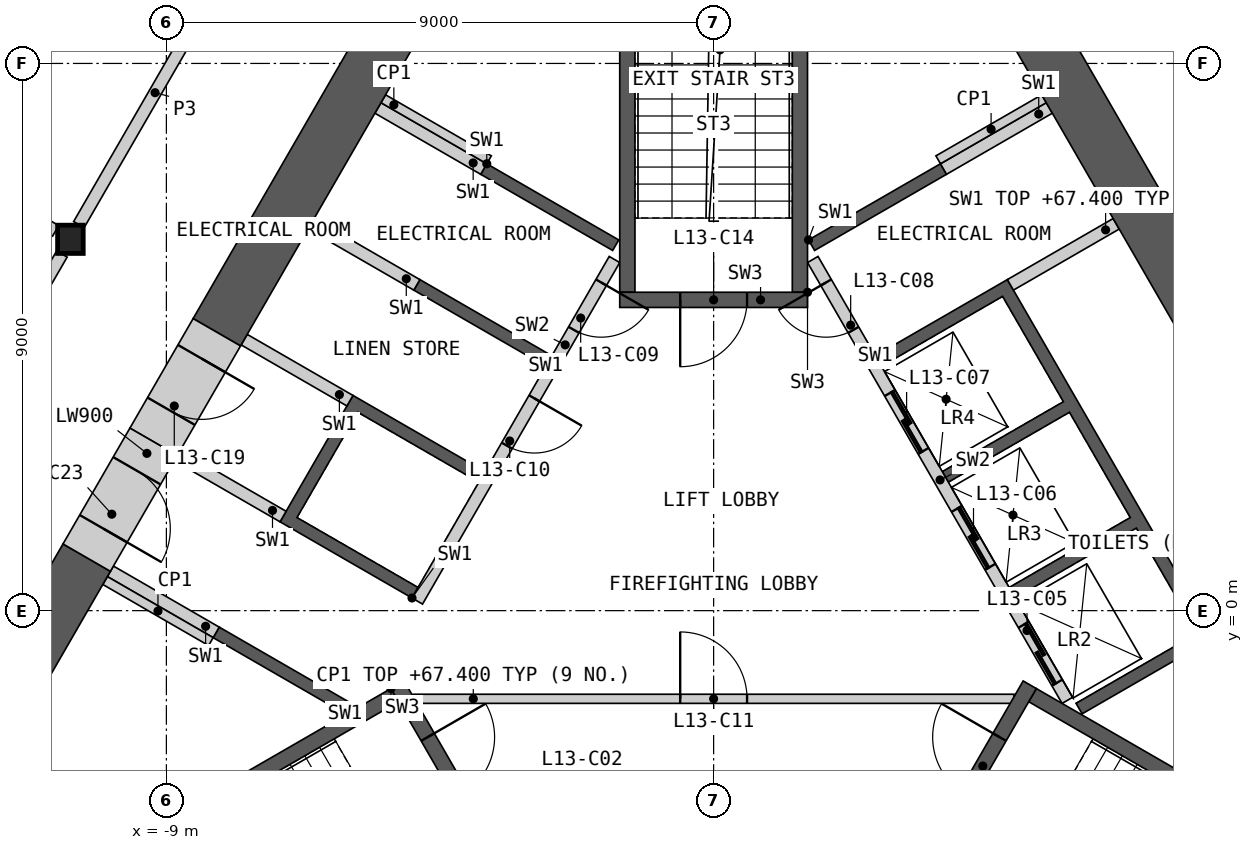
"""IFC4 building model, lengths in metres.
Left out: names, types, materials, properties, quantities, classifications, styles, units other than length and angle.
Written with IfcOpenShell. Run it as: python <this file> out.ifc"""

import sys

from ifc_helpers import new_model, si_unit, direction, frame, frame_2d, origin, origin_2d, place, context, subcontext, project, spatial, polyline, rectangle, i_section, outline, extrude, element, fill, save


model = new_model("IFC4")
c1 = context("Model", 3, precision=1e-05, world=origin(), true_north=direction((0.0, 1.0)))
c2 = subcontext(c1, "Body", "Model", "MODEL_VIEW")
j1 = project(units=[si_unit("LENGTHUNIT", "METRE"), si_unit("PLANEANGLEUNIT", "RADIAN")], contexts=[c1])
p1 = place(None, origin())
s1 = spatial("IfcSite", under=j1, at=p1, CompositionType="ELEMENT")
p2 = place(p1, origin())
s2 = spatial("IfcBuilding", under=s1, at=p2, CompositionType="ELEMENT")
p3 = place(p2, frame((0.0, 0.0, 63.6)))
s3 = spatial("IfcBuildingStorey", under=s2, at=p3, CompositionType="ELEMENT", Elevation=63.6)
p4 = place(p3, frame((-10.578, 6.107, 0.0), z_axis=(0.0, 0.0, 1.0), x_axis=(1.0, 0.0, 0.0)))
e1 = element("IfcColumn", 1, at=p4, inside=s3, PredefinedType="COLUMN", context=c2, shape_type="SweptSolid", body=[
    extrude(i_section(OverallWidth=0.421, OverallDepth=0.465, WebThickness=0.045, FlangeThickness=0.072, at=origin_2d()), origin(), (0.0, 0.0, 1.0), 4.2),
])
p5 = place(p3, origin())
e2 = element("IfcWall", 2, at=p5, inside=s3, PredefinedType="SHEAR", context=c2, shape_type="SweptSolid", body=[
    extrude(outline(polyline([(1.561, 6.097), (3.731, 7.35), (3.831, 7.177), (1.66, 5.924), (1.561, 6.097)])), origin(), (0.0, 0.0, 1.0), 3.8),
])
p6 = place(p3, origin())
e3 = element("IfcWall", 3, at=p6, inside=s3, PredefinedType="SHEAR", context=c2, shape_type="SweptSolid", body=[
    extrude(outline(polyline([(2.66, 4.192), (4.831, 5.445), (8.231, -0.444), (6.061, -1.697), (5.96, -1.524), (7.952, -0.374), (6.952, 1.358), (4.96, 0.208), (4.861, 0.381), (6.852, 1.531), (5.852, 3.263), (3.861, 2.113), (3.76, 2.287), (5.752, 3.437), (4.752, 5.169), (2.76, 4.019), (2.66, 4.192)])), origin(), (0.0, 0.0, 1.0), 3.8),
])
p7 = place(p3, frame((5.817, -1.476, 0.0), z_axis=(0.0, 0.0, 1.0), x_axis=(-0.500002616675, 0.866023893041, 0.0)))
e4 = element("IfcWall", 4, at=p7, inside=s3, PredefinedType="SOLIDWALL", context=c2, shape_type="SweptSolid", body=[
    extrude(rectangle(XDim=8.373, YDim=0.2, at=frame_2d((4.187, 0.0))), origin(), (0.0, 0.0, 1.0), 3.8),
])
p8 = place(p7, frame((0.337, 0.0, 0.0)))
e5 = element("IfcOpeningElement", 5, at=p8, cuts=e4, PredefinedType="OPENING", context=c2, shape_type="SweptSolid", body=[
    extrude(rectangle(XDim=1.1, YDim=2.1, at=frame_2d((0.55, 1.05))), frame((0.0, 0.11, 0.0), z_axis=(0.0, -1.0, 0.0), x_axis=(1.0, 0.0, 0.0)), (0.0, 0.0, 1.0), 0.22),
])
p9 = place(p7, frame((2.537, 0.0, 0.0)))
e6 = element("IfcOpeningElement", 6, at=p9, cuts=e4, PredefinedType="OPENING", context=c2, shape_type="SweptSolid", body=[
    extrude(rectangle(XDim=1.1, YDim=2.1, at=frame_2d((0.55, 1.05))), frame((0.0, 0.11, 0.0), z_axis=(0.0, -1.0, 0.0), x_axis=(1.0, 0.0, 0.0)), (0.0, 0.0, 1.0), 0.22),
])
p10 = place(p7, frame((4.737, 0.0, 0.0)))
e7 = element("IfcOpeningElement", 7, at=p10, cuts=e4, PredefinedType="OPENING", context=c2, shape_type="SweptSolid", body=[
    extrude(rectangle(XDim=1.1, YDim=2.1, at=frame_2d((0.55, 1.05))), frame((0.0, 0.11, 0.0), z_axis=(0.0, -1.0, 0.0), x_axis=(1.0, 0.0, 0.0)), (0.0, 0.0, 1.0), 0.22),
])
p11 = place(p7, frame((7.037, 0.0, 0.0)))
e8 = element("IfcOpeningElement", 8, at=p11, cuts=e4, PredefinedType="OPENING", context=c2, shape_type="SweptSolid", body=[
    extrude(rectangle(XDim=0.9, YDim=2.1, at=frame_2d((0.45, 1.05))), frame((0.0, 0.11, 0.0), z_axis=(0.0, -1.0, 0.0), x_axis=(1.0, 0.0, 0.0)), (0.0, 0.0, 1.0), 0.22),
])
p12 = place(p3, frame((4.881, 5.358, 0.0), z_axis=(0.0, 0.0, 1.0), x_axis=(0.866035824272, 0.499981950752, 0.0)))
e9 = element("IfcWall", 9, at=p12, inside=s3, PredefinedType="SHEAR", context=c2, shape_type="SweptSolid", body=[
    extrude(rectangle(XDim=2.009, YDim=0.2, at=frame_2d((1.004, 0.0))), origin(), (0.0, 0.0, 1.0), 3.8),
])
p13 = place(p3, frame((3.781, 7.263, 0.0), z_axis=(0.0, 0.0, 1.0), x_axis=(0.865983199114, 0.50007309351, 0.0)))
e10 = element("IfcWall", 10, at=p13, inside=s3, PredefinedType="SHEAR", context=c2, shape_type="SweptSolid", body=[
    extrude(rectangle(XDim=2.009, YDim=0.2, at=frame_2d((1.004, 0.0))), origin(), (0.0, 0.0, 1.0), 3.8),
])
p14 = place(p3, origin())
e11 = element("IfcWall", 11, at=p14, inside=s3, PredefinedType="SHEAR", context=c2, shape_type="SweptSolid", body=[
    extrude(outline(polyline([(-6.061, -1.697), (-8.231, -0.444), (-8.131, -0.271), (-5.96, -1.524), (-6.061, -1.697)])), origin(), (0.0, 0.0, 1.0), 3.8),
])
p15 = place(p3, origin())
e12 = element("IfcWall", 12, at=p15, inside=s3, PredefinedType="SHEAR", context=c2, shape_type="SweptSolid", body=[
    extrude(outline(polyline([(-4.96, 0.208), (-7.131, 1.461), (-5.931, 3.54), (-3.76, 2.287), (-3.861, 2.113), (-5.852, 3.263), (-6.852, 1.531), (-4.861, 0.381), (-4.96, 0.208)])), origin(), (0.0, 0.0, 1.0), 3.8),
])
p16 = place(p3, origin())
e13 = element("IfcWall", 13, at=p16, inside=s3, PredefinedType="SHEAR", context=c2, shape_type="SweptSolid", body=[
    extrude(outline(polyline([(-2.76, 4.019), (-4.931, 5.272), (-4.831, 5.445), (-2.66, 4.192), (-2.76, 4.019)])), origin(), (0.0, 0.0, 1.0), 3.8),
])
p17 = place(p3, origin())
e14 = element("IfcWall", 14, at=p17, inside=s3, PredefinedType="SHEAR", context=c2, shape_type="SweptSolid", body=[
    extrude(outline(polyline([(-3.731, 7.35), (-1.561, 6.097), (-1.66, 5.924), (-3.831, 7.177), (-3.731, 7.35)])), origin(), (0.0, 0.0, 1.0), 3.8),
])
p18 = place(p3, frame((-1.631, 5.776, 0.0), z_axis=(0.0, 0.0, 1.0), x_axis=(-0.499992876559, -0.866029516466, 0.0)))
e15 = element("IfcWall", 15, at=p18, inside=s3, PredefinedType="SOLIDWALL", context=c2, shape_type="SweptSolid", body=[
    extrude(rectangle(XDim=6.486, YDim=0.2, at=frame_2d((3.243, 0.0))), origin(), (0.0, 0.0, 1.0), 3.8),
])
p19 = place(p18, frame((0.437, 0.0, 0.0)))
e16 = element("IfcOpeningElement", 16, at=p19, cuts=e15, PredefinedType="OPENING", context=c2, shape_type="SweptSolid", body=[
    extrude(rectangle(XDim=0.9, YDim=2.1, at=frame_2d((0.45, 1.05))), frame((0.0, 0.11, 0.0), z_axis=(0.0, -1.0, 0.0), x_axis=(1.0, 0.0, 0.0)), (0.0, 0.0, 1.0), 0.22),
])
p20 = place(p18, frame((2.637, 0.0, 0.0)))
e17 = element("IfcOpeningElement", 17, at=p20, cuts=e15, PredefinedType="OPENING", context=c2, shape_type="SweptSolid", body=[
    extrude(rectangle(XDim=0.9, YDim=2.1, at=frame_2d((0.45, 1.05))), frame((0.0, 0.11, 0.0), z_axis=(0.0, -1.0, 0.0), x_axis=(1.0, 0.0, 0.0)), (0.0, 0.0, 1.0), 0.22),
])
p21 = place(p3, frame((-3.781, 7.263, 0.0), z_axis=(0.0, 0.0, 1.0), x_axis=(-0.865983199114, 0.50007309351, 0.0)))
e18 = element("IfcWall", 18, at=p21, inside=s3, PredefinedType="SHEAR", context=c2, shape_type="SweptSolid", body=[
    extrude(rectangle(XDim=2.009, YDim=0.2, at=frame_2d((1.004, 0.0))), origin(), (0.0, 0.0, 1.0), 3.8),
])
p22 = place(p3, frame((-4.881, 5.358, 0.0), z_axis=(0.0, 0.0, 1.0), x_axis=(-0.866035824272, 0.499981950752, 0.0)))
e19 = element("IfcWall", 19, at=p22, inside=s3, PredefinedType="SHEAR", context=c2, shape_type="SweptSolid", body=[
    extrude(rectangle(XDim=2.009, YDim=0.2, at=frame_2d((1.004, 0.0))), origin(), (0.0, 0.0, 1.0), 3.8),
])
p23 = place(p3, frame((-5.981, 3.453, 0.0), z_axis=(0.0, 0.0, 1.0), x_axis=(-0.866013584312, 0.500020471368, 0.0)))
e20 = element("IfcWall", 20, at=p23, inside=s3, PredefinedType="SHEAR", context=c2, shape_type="SweptSolid", body=[
    extrude(rectangle(XDim=2.009, YDim=0.2, at=frame_2d((1.005, 0.0))), origin(), (0.0, 0.0, 1.0), 3.8),
])
p24 = place(p3, frame((-7.081, 1.548, 0.0), z_axis=(0.0, 0.0, 1.0), x_axis=(-0.865983199114, 0.50007309351, 0.0)))
e21 = element("IfcWall", 21, at=p24, inside=s3, PredefinedType="SHEAR", context=c2, shape_type="SweptSolid", body=[
    extrude(rectangle(XDim=2.009, YDim=0.2, at=frame_2d((1.004, 0.0))), origin(), (0.0, 0.0, 1.0), 3.8),
])
p25 = place(p3, frame((-8.181, -0.357, 0.0), z_axis=(0.0, 0.0, 1.0), x_axis=(-0.866035824272, 0.499981950752, 0.0)))
e22 = element("IfcWall", 22, at=p25, inside=s3, PredefinedType="SHEAR", context=c2, shape_type="SweptSolid", body=[
    extrude(rectangle(XDim=2.009, YDim=0.2, at=frame_2d((1.004, 0.0))), origin(), (0.0, 0.0, 1.0), 3.8),
])
p26 = place(p3, frame((-4.941, -1.45, 0.0), z_axis=(0.0, 0.0, 1.0), x_axis=(1.0, 0.0, 0.0)))
e23 = element("IfcWall", 23, at=p26, inside=s3, PredefinedType="PARTITIONING", context=c2, shape_type="SweptSolid", body=[
    extrude(rectangle(XDim=9.882, YDim=0.15, at=frame_2d((4.941, 0.0))), origin(), (0.0, 0.0, 1.0), 3.8),
])
p27 = place(p26, frame((4.391, 0.0, 0.0)))
e24 = element("IfcOpeningElement", 24, at=p27, cuts=e23, PredefinedType="OPENING", context=c2, shape_type="SweptSolid", body=[
    extrude(rectangle(XDim=1.1, YDim=2.1, at=frame_2d((0.55, 1.05))), frame((0.0, 0.085, 0.0), z_axis=(0.0, -1.0, 0.0), x_axis=(1.0, 0.0, 0.0)), (0.0, 0.0, 1.0), 0.17),
])
p28 = place(p3, origin())
e25 = element("IfcWall", 25, at=p28, inside=s3, PredefinedType="SHEAR", context=c2, shape_type="SweptSolid", body=[
    extrude(outline(polyline([(-5.307, -1.281), (-10.374, -4.206), (-10.032, -4.298), (-5.182, -1.498), (-5.307, -1.281)])), origin(), (0.0, 0.0, 1.0), 3.8),
])
p29 = place(p3, frame((-5.199, -1.219, 0.0), z_axis=(0.0, 0.0, 1.0), x_axis=(0.499982516597, -0.866035497597, 0.0)))
e26 = element("IfcWall", 26, at=p29, inside=s3, PredefinedType="SHEAR", context=c2, shape_type="SweptSolid", body=[
    extrude(rectangle(XDim=3.088, YDim=0.25, at=frame_2d((1.544, 0.0))), origin(), (0.0, 0.0, 1.0), 3.8),
])
p30 = place(p29, frame((0.994, 0.0, 0.0)))
e27 = element("IfcOpeningElement", 27, at=p30, cuts=e26, PredefinedType="OPENING", context=c2, shape_type="SweptSolid", body=[
    extrude(rectangle(XDim=1.1, YDim=2.1, at=frame_2d((0.55, 1.05))), frame((0.0, 0.135, 0.0), z_axis=(0.0, -1.0, 0.0), x_axis=(1.0, 0.0, 0.0)), (0.0, 0.0, 1.0), 0.27),
])
p31 = place(p3, origin())
e28 = element("IfcWall", 28, at=p31, inside=s3, PredefinedType="SHEAR", context=c2, shape_type="SweptSolid", body=[
    extrude(outline(polyline([(10.032, -4.298), (10.374, -4.206), (5.307, -1.281), (5.182, -1.498), (10.032, -4.298)])), origin(), (0.0, 0.0, 1.0), 3.8),
])
p32 = place(p3, frame((3.655, -3.893, 0.0), z_axis=(0.0, 0.0, 1.0), x_axis=(0.499982516597, 0.866035497597, 0.0)))
e29 = element("IfcWall", 29, at=p32, inside=s3, PredefinedType="SHEAR", context=c2, shape_type="SweptSolid", body=[
    extrude(rectangle(XDim=3.088, YDim=0.25, at=frame_2d((1.544, 0.0))), origin(), (0.0, 0.0, 1.0), 3.8),
])
p33 = place(p32, frame((0.994, 0.0, 0.0)))
e30 = element("IfcOpeningElement", 30, at=p33, cuts=e29, PredefinedType="OPENING", context=c2, shape_type="SweptSolid", body=[
    extrude(rectangle(XDim=1.1, YDim=2.1, at=frame_2d((0.55, 1.05))), frame((0.0, 0.135, 0.0), z_axis=(0.0, -1.0, 0.0), x_axis=(1.0, 0.0, 0.0)), (0.0, 0.0, 1.0), 0.27),
])
p34 = place(p3, origin())
e31 = element("IfcWall", 31, at=p34, inside=s3, PredefinedType="SHEAR", context=c2, shape_type="SweptSolid", body=[
    extrude(outline(polyline([(1.544, 5.237), (1.544, 11.087), (1.294, 10.837), (1.294, 5.237), (1.544, 5.237)])), origin(), (0.0, 0.0, 1.0), 3.8),
])
p35 = place(p3, origin())
e32 = element("IfcWall", 32, at=p35, inside=s3, PredefinedType="SHEAR", context=c2, shape_type="SweptSolid", body=[
    extrude(outline(polyline([(-1.294, 10.837), (-1.544, 11.087), (-1.544, 5.237), (-1.294, 5.237), (-1.294, 10.837)])), origin(), (0.0, 0.0, 1.0), 3.8),
])
p36 = place(p3, frame((1.544, 5.112, 0.0), z_axis=(0.0, 0.0, 1.0), x_axis=(-1.0, 0.0, 0.0)))
e33 = element("IfcWall", 33, at=p36, inside=s3, PredefinedType="SHEAR", context=c2, shape_type="SweptSolid", body=[
    extrude(rectangle(XDim=3.088, YDim=0.25, at=frame_2d((1.544, 0.0))), origin(), (0.0, 0.0, 1.0), 3.8),
])
p37 = place(p36, frame((0.994, 0.0, 0.0)))
e34 = element("IfcOpeningElement", 34, at=p37, cuts=e33, PredefinedType="OPENING", context=c2, shape_type="SweptSolid", body=[
    extrude(rectangle(XDim=1.1, YDim=2.1, at=frame_2d((0.55, 1.05))), frame((0.0, 0.135, 0.0), z_axis=(0.0, -1.0, 0.0), x_axis=(1.0, 0.0, 0.0)), (0.0, 0.0, 1.0), 0.27),
])
for number, where, z_axis, x_axis in (
    (35, (3.693, 7.415, 0.0), (0.0, 0.0, 1.0), (0.866, 0.5, 0.0)),
    (36, (-8.268, -0.509, 0.0), (0.0, 0.0, 1.0), (-0.866, 0.5, 0.0)),
    (37, (-3.693, 7.415, 0.0), (0.0, 0.0, 1.0), (-0.866, 0.5, 0.0)),
):
    element("IfcWall", number, at=place(p3, frame(where, z_axis=z_axis, x_axis=x_axis)), inside=s3, PredefinedType="PARTITIONING", context=c2, shape_type="SweptSolid", body=[
        extrude(rectangle(XDim=2.009, YDim=0.15, at=frame_2d((1.004, 0.0))), origin(), (0.0, 0.0, 1.0), 3.8),
    ])
p38 = place(p3, frame((8.16, 4.596, 0.0), z_axis=(0.0, 0.0, 1.0), x_axis=(-0.500009830349, 0.866019728156, 0.0)))
e38 = element("IfcWall", 38, at=p38, inside=s3, PredefinedType="SHEAR", context=c2, shape_type="SweptSolid", body=[
    extrude(rectangle(XDim=15.541, YDim=0.9, at=frame_2d((7.771, 0.0))), origin(), (0.0, 0.0, 1.0), 3.8),
])
p39 = place(p3, frame((-3.637, 12.43, 0.0), z_axis=(0.0, 0.0, 1.0), x_axis=(-0.500011513458, -0.866018756384, 0.0)))
e39 = element("IfcWall", 39, at=p39, inside=s3, PredefinedType="SHEAR", context=c2, shape_type="SweptSolid", body=[
    extrude(rectangle(XDim=9.066, YDim=0.9, at=frame_2d((4.533, 0.0))), origin(), (0.0, 0.0, 1.0), 3.8),
])
p40 = place(p3, frame((-10.31, 0.872, 0.0), z_axis=(0.0, 0.0, 1.0), x_axis=(-0.499968858743, -0.866043382451, 0.0)))
e40 = element("IfcWall", 40, at=p40, inside=s3, PredefinedType="SHEAR", context=c2, shape_type="SweptSolid", body=[
    extrude(rectangle(XDim=4.546, YDim=0.9, at=frame_2d((2.273, 0.0))), origin(), (0.0, 0.0, 1.0), 3.8),
])
p41 = place(p3, frame((-8.17, 4.579, 0.0), z_axis=(0.0, 0.0, 1.0), x_axis=(-0.499888406853, -0.866089822532, 0.0)))
e41 = element("IfcWall", 41, at=p41, inside=s3, PredefinedType="SHEAR", context=c2, shape_type="SweptSolid", body=[
    extrude(rectangle(XDim=2.08, YDim=0.9, at=frame_2d((1.04, 0.0))), origin(), (0.0, 0.0, 1.0), 3.8),
])
p42 = place(p41, frame((0.5, 0.0, 0.0)))
e42 = element("IfcOpeningElement", 42, at=p42, cuts=e41, PredefinedType="OPENING", context=c2, shape_type="SweptSolid", body=[
    extrude(rectangle(XDim=1.0, YDim=2.1, at=frame_2d((0.5, 1.05))), frame((0.0, 0.46, 0.0), z_axis=(0.0, -1.0, 0.0), x_axis=(1.0, 0.0, 0.0)), (0.0, 0.0, 1.0), 0.92),
])
p43 = place(p3, frame((-9.21, 2.777, 0.0), z_axis=(0.0, 0.0, 1.0), x_axis=(-0.500077893725, -0.86598042715, 0.0)))
e43 = element("IfcWall", 43, at=p43, inside=s3, PredefinedType="SHEAR", context=c2, shape_type="SweptSolid", body=[
    extrude(rectangle(XDim=2.2, YDim=0.9, at=frame_2d((1.1, 0.0))), origin(), (0.0, 0.0, 1.0), 3.8),
])
p44 = place(p43, frame((0.55, 0.0, 0.0)))
e44 = element("IfcOpeningElement", 44, at=p44, cuts=e43, PredefinedType="OPENING", context=c2, shape_type="SweptSolid", body=[
    extrude(rectangle(XDim=1.1, YDim=2.1, at=frame_2d((0.55, 1.05))), frame((0.0, 0.46, 0.0), z_axis=(0.0, -1.0, 0.0), x_axis=(1.0, 0.0, 0.0)), (0.0, 0.0, 1.0), 0.92),
])
p45 = place(p3, frame((5.429, 15.026, 0.0), z_axis=(0.0, 0.0, 1.0), x_axis=(0.50001002959, -0.86601961312, 0.0)))
e45 = element("IfcWall", 45, at=p45, inside=s3, PredefinedType="PARTITIONING", context=c2, shape_type="SweptSolid", body=[
    extrude(rectangle(XDim=10.019, YDim=0.2, at=frame_2d((5.009, 0.0))), origin(), (0.0, 0.0, 1.0), 3.8),
])
p46 = place(p45, frame((4.059, 0.0, 0.0)))
e46 = element("IfcOpeningElement", 46, at=p46, cuts=e45, PredefinedType="OPENING", context=c2, shape_type="SweptSolid", body=[
    extrude(rectangle(XDim=1.8, YDim=2.1, at=frame_2d((0.9, 1.05))), frame((0.0, 0.11, 0.0), z_axis=(0.0, -1.0, 0.0), x_axis=(1.0, 0.0, 0.0)), (0.0, 0.0, 1.0), 0.22),
])
p47 = place(p3, frame((-10.439, 6.35, 0.0), z_axis=(0.0, 0.0, 1.0), x_axis=(0.50001002959, 0.86601961312, 0.0)))
e47 = element("IfcWall", 47, at=p47, inside=s3, PredefinedType="PARTITIONING", context=c2, shape_type="SweptSolid", body=[
    extrude(rectangle(XDim=10.019, YDim=0.2, at=frame_2d((5.009, 0.0))), origin(), (0.0, 0.0, 1.0), 3.8),
])
p48 = place(p47, frame((4.259, 0.0, 0.0)))
e48 = element("IfcOpeningElement", 48, at=p48, cuts=e47, PredefinedType="OPENING", context=c2, shape_type="SweptSolid", body=[
    extrude(rectangle(XDim=1.0, YDim=2.1, at=frame_2d((0.5, 1.05))), frame((0.0, 0.11, 0.0), z_axis=(0.0, -1.0, 0.0), x_axis=(1.0, 0.0, 0.0)), (0.0, 0.0, 1.0), 0.22),
])
p49 = place(p3, frame((-15.728, -2.811, 0.0), z_axis=(0.0, 0.0, 1.0), x_axis=(0.49999175339, 0.866030164915, 0.0)))
e49 = element("IfcWall", 49, at=p49, inside=s3, PredefinedType="PARTITIONING", context=c2, shape_type="SweptSolid", body=[
    extrude(rectangle(XDim=10.019, YDim=0.2, at=frame_2d((5.009, 0.0))), origin(), (0.0, 0.0, 1.0), 3.8),
])
p50 = place(p49, frame((7.266, 0.0, 0.0)))
e50 = element("IfcOpeningElement", 50, at=p50, cuts=e49, PredefinedType="OPENING", context=c2, shape_type="SweptSolid", body=[
    extrude(rectangle(XDim=1.0, YDim=2.1, at=frame_2d((0.5, 1.05))), frame((0.0, 0.11, 0.0), z_axis=(0.0, -1.0, 0.0), x_axis=(1.0, 0.0, 0.0)), (0.0, 0.0, 1.0), 0.22),
])
p51 = place(p3, frame((-21.947, 12.671, 0.0), z_axis=(0.0, 0.0, 1.0), x_axis=(0.866026729935, -0.499997703033, 0.0)))
e51 = element("IfcWall", 51, at=p51, inside=s3, PredefinedType="PARTITIONING", context=c2, shape_type="SweptSolid", body=[
    extrude(rectangle(XDim=12.848, YDim=0.2, at=frame_2d((6.424, 0.0))), origin(), (0.0, 0.0, 1.0), 2.885),
])
p52 = place(p8, origin())
e52 = element("IfcDoor", 52, at=p52, inside=s3, OperationType="SLIDING_TO_LEFT", PredefinedType="DOOR", context=c2, shape_type="SweptSolid", body=[
    extrude(rectangle(XDim=1.1, YDim=2.1, at=frame_2d((0.55, 1.05))), frame((0.0, 0.025, 0.0), z_axis=(0.0, -1.0, 0.0), x_axis=(1.0, 0.0, 0.0)), (0.0, 0.0, 1.0), 0.05),
])
fill(e5, e52)
p53 = place(p9, origin())
e53 = element("IfcDoor", 53, at=p53, inside=s3, OperationType="SLIDING_TO_LEFT", PredefinedType="DOOR", context=c2, shape_type="SweptSolid", body=[
    extrude(rectangle(XDim=1.1, YDim=2.1, at=frame_2d((0.55, 1.05))), frame((0.0, 0.025, 0.0), z_axis=(0.0, -1.0, 0.0), x_axis=(1.0, 0.0, 0.0)), (0.0, 0.0, 1.0), 0.05),
])
fill(e6, e53)
p54 = place(p10, origin())
e54 = element("IfcDoor", 54, at=p54, inside=s3, OperationType="SLIDING_TO_LEFT", PredefinedType="DOOR", context=c2, shape_type="SweptSolid", body=[
    extrude(rectangle(XDim=1.1, YDim=2.1, at=frame_2d((0.55, 1.05))), frame((0.0, 0.025, 0.0), z_axis=(0.0, -1.0, 0.0), x_axis=(1.0, 0.0, 0.0)), (0.0, 0.0, 1.0), 0.05),
])
fill(e7, e54)
p55 = place(p11, origin())
e55 = element("IfcDoor", 55, at=p55, inside=s3, OperationType="SINGLE_SWING_RIGHT", PredefinedType="DOOR", context=c2, shape_type="SweptSolid", body=[
    extrude(rectangle(XDim=0.9, YDim=2.1, at=frame_2d((0.45, 1.05))), frame((0.0, 0.025, 0.0), z_axis=(0.0, -1.0, 0.0), x_axis=(1.0, 0.0, 0.0)), (0.0, 0.0, 1.0), 0.05),
])
fill(e8, e55)
p56 = place(p19, origin())
e56 = element("IfcDoor", 56, at=p56, inside=s3, OperationType="SINGLE_SWING_LEFT", PredefinedType="DOOR", context=c2, shape_type="SweptSolid", body=[
    extrude(rectangle(XDim=0.9, YDim=2.1, at=frame_2d((0.45, 1.05))), frame((0.0, 0.025, 0.0), z_axis=(0.0, -1.0, 0.0), x_axis=(1.0, 0.0, 0.0)), (0.0, 0.0, 1.0), 0.05),
])
fill(e16, e56)
p57 = place(p20, origin())
e57 = element("IfcDoor", 57, at=p57, inside=s3, OperationType="SINGLE_SWING_LEFT", PredefinedType="DOOR", context=c2, shape_type="SweptSolid", body=[
    extrude(rectangle(XDim=0.9, YDim=2.1, at=frame_2d((0.45, 1.05))), frame((0.0, 0.025, 0.0), z_axis=(0.0, -1.0, 0.0), x_axis=(1.0, 0.0, 0.0)), (0.0, 0.0, 1.0), 0.05),
])
fill(e17, e57)
p58 = place(p27, origin())
e58 = element("IfcDoor", 58, at=p58, inside=s3, OperationType="SINGLE_SWING_LEFT", PredefinedType="DOOR", context=c2, shape_type="SweptSolid", body=[
    extrude(rectangle(XDim=1.1, YDim=2.1, at=frame_2d((0.55, 1.05))), frame((0.0, 0.025, 0.0), z_axis=(0.0, -1.0, 0.0), x_axis=(1.0, 0.0, 0.0)), (0.0, 0.0, 1.0), 0.05),
])
fill(e24, e58)
p59 = place(p30, origin())
e59 = element("IfcDoor", 59, at=p59, inside=s3, OperationType="SINGLE_SWING_LEFT", PredefinedType="DOOR", context=c2, shape_type="SweptSolid", body=[
    extrude(rectangle(XDim=1.1, YDim=2.1, at=frame_2d((0.55, 1.05))), frame((0.0, 0.025, 0.0), z_axis=(0.0, -1.0, 0.0), x_axis=(1.0, 0.0, 0.0)), (0.0, 0.0, 1.0), 0.05),
])
fill(e27, e59)
p60 = place(p33, origin())
e60 = element("IfcDoor", 60, at=p60, inside=s3, OperationType="SINGLE_SWING_RIGHT", PredefinedType="DOOR", context=c2, shape_type="SweptSolid", body=[
    extrude(rectangle(XDim=1.1, YDim=2.1, at=frame_2d((0.55, 1.05))), frame((0.0, 0.025, 0.0), z_axis=(0.0, -1.0, 0.0), x_axis=(1.0, 0.0, 0.0)), (0.0, 0.0, 1.0), 0.05),
])
fill(e30, e60)
p61 = place(p37, origin())
e61 = element("IfcDoor", 61, at=p61, inside=s3, OperationType="SINGLE_SWING_RIGHT", PredefinedType="DOOR", context=c2, shape_type="SweptSolid", body=[
    extrude(rectangle(XDim=1.1, YDim=2.1, at=frame_2d((0.55, 1.05))), frame((0.0, 0.025, 0.0), z_axis=(0.0, -1.0, 0.0), x_axis=(1.0, 0.0, 0.0)), (0.0, 0.0, 1.0), 0.05),
])
fill(e34, e61)
p62 = place(p42, origin())
e62 = element("IfcDoor", 62, at=p62, inside=s3, OperationType="SINGLE_SWING_LEFT", PredefinedType="DOOR", context=c2, shape_type="SweptSolid", body=[
    extrude(rectangle(XDim=1.0, YDim=2.1, at=frame_2d((0.5, 1.05))), frame((0.0, 0.205, 0.0), z_axis=(0.0, -1.0, 0.0), x_axis=(1.0, 0.0, 0.0)), (0.0, 0.0, 1.0), 0.05),
])
fill(e42, e62)
p63 = place(p44, origin())
e63 = element("IfcDoor", 63, at=p63, inside=s3, OperationType="SINGLE_SWING_RIGHT", PredefinedType="DOOR", context=c2, shape_type="SweptSolid", body=[
    extrude(rectangle(XDim=1.1, YDim=2.1, at=frame_2d((0.55, 1.05))), frame((0.0, 0.205, 0.0), z_axis=(0.0, -1.0, 0.0), x_axis=(1.0, 0.0, 0.0)), (0.0, 0.0, 1.0), 0.05),
])
fill(e44, e63)
save(model, sys.argv[1])
